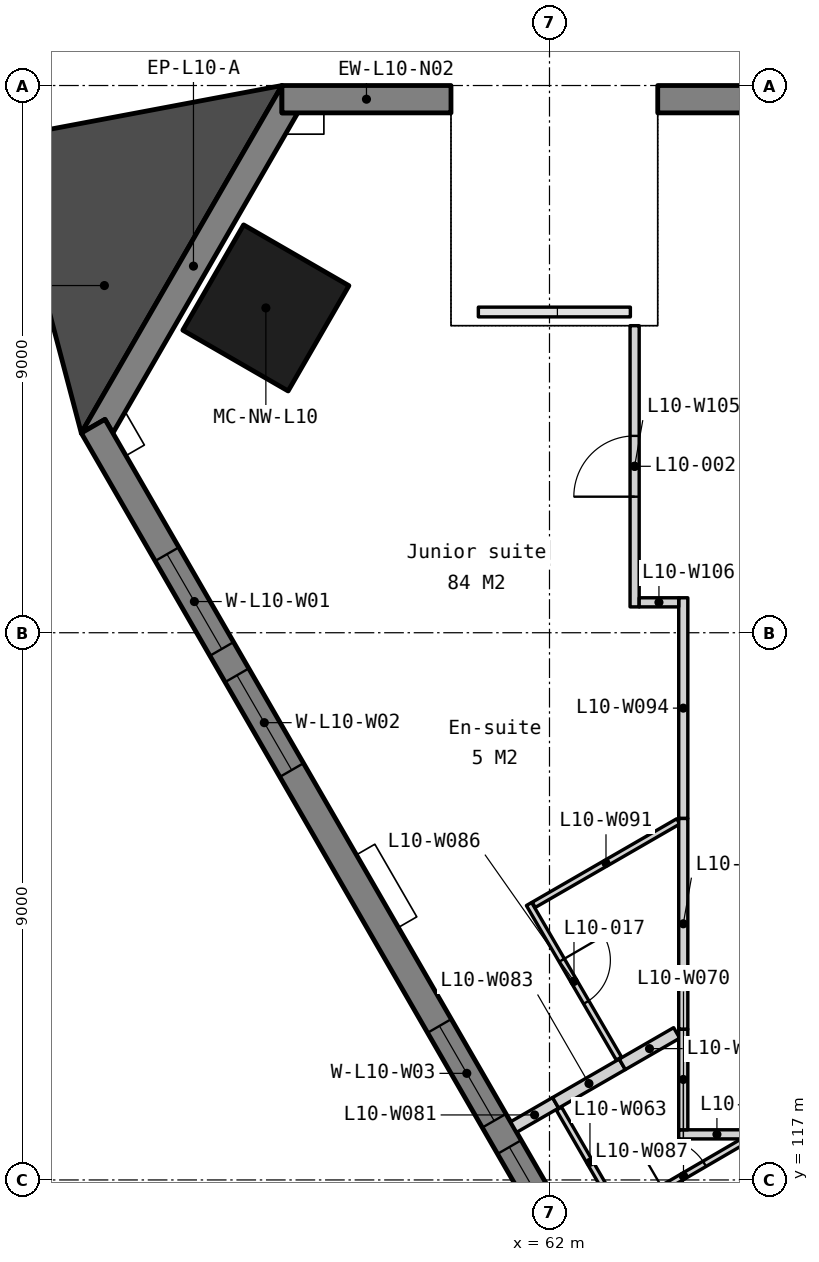
"""IFC4 building model, lengths in metres.
Left out: names, types, materials, properties, quantities, classifications, styles, units other than length and angle.
Written with IfcOpenShell. Run it as: python <this file> out.ifc"""

import sys

from ifc_helpers import new_model, si_unit, direction, frame, frame_2d, origin, origin_2d, place, context, subcontext, project, spatial, polyline, rectangle, outline, extrude, element, fill, save


model = new_model("IFC4")
c1 = context("Model", 3, precision=1e-05, world=origin(), true_north=direction((0.0, 1.0)))
c2 = subcontext(c1, "Body", "Model", "MODEL_VIEW")
j1 = project(units=[si_unit("LENGTHUNIT", "METRE"), si_unit("PLANEANGLEUNIT", "RADIAN")], contexts=[c1])
p1 = place(None, origin())
s1 = spatial("IfcSite", under=j1, at=p1, CompositionType="ELEMENT")
p2 = place(p1, origin())
s2 = spatial("IfcBuilding", under=s1, at=p2, CompositionType="ELEMENT")
p3 = place(p2, frame((0.0, 0.0, 49.0)))
s3 = spatial("IfcBuildingStorey", under=s2, at=p3, CompositionType="ELEMENT", Elevation=49.0)
p4 = place(p3, frame((57.336, 131.342, 0.0), z_axis=(0.0, 0.0, 1.0), x_axis=(-0.5, -0.866025403784, 0.0)))
e1 = element("IfcColumn", 1, at=p4, inside=s3, PredefinedType="COLUMN", context=c2, shape_type="SweptSolid", body=[
    extrude(rectangle(XDim=2.0, YDim=2.0, at=origin_2d()), origin(), (0.0, 0.0, 1.0), 3.5),
])
p5 = place(p3, frame((0.0, 0.0, -0.15)))
e2 = element("IfcWall", 2, at=p5, inside=s3, PredefinedType="SOLIDWALL", context=c2, shape_type="SweptSolid", body=[
    extrude(outline(polyline([(57.6, 135.0), (57.6, 134.55), (57.86, 134.55), (54.82, 129.284), (54.69, 129.509), (54.3, 129.284), (57.6, 135.0)])), origin(), (0.0, 0.0, 1.0), 3.5),
])
p6 = place(p3, frame((102.4, 134.775, -0.15), z_axis=(0.0, 0.0, 1.0), x_axis=(-1.0, 0.0, 0.0)))
e3 = element("IfcWall", 3, at=p6, inside=s3, PredefinedType="SOLIDWALL", context=c2, shape_type="SweptSolid", body=[
    extrude(outline(polyline([(0.0, 0.0), (0.0, 3.5), (38.62, 3.5), (38.62, 0.0), (0.0, 0.0)])), frame((0.0, 0.225, 0.0), z_axis=(0.0, -1.0, 0.0), x_axis=(1.0, 0.0, 0.0)), (0.0, 0.0, 1.0), 0.45),
])
p7 = place(p6, frame((2.43, 0.0, 1.05)))
e4 = element("IfcOpeningElement", 4, at=p7, cuts=e3, PredefinedType="OPENING", context=c2, shape_type="SweptSolid", body=[
    extrude(rectangle(XDim=1.8, YDim=1.5, at=frame_2d((0.9, 0.75))), frame((0.0, 0.235, 0.0), z_axis=(0.0, -1.0, 0.0), x_axis=(1.0, 0.0, 0.0)), (0.0, 0.0, 1.0), 0.47),
])
p8 = place(p6, frame((4.73, 0.0, 1.05)))
e5 = element("IfcOpeningElement", 5, at=p8, cuts=e3, PredefinedType="OPENING", context=c2, shape_type="SweptSolid", body=[
    extrude(rectangle(XDim=1.8, YDim=1.5, at=frame_2d((0.9, 0.75))), frame((0.0, 0.235, 0.0), z_axis=(0.0, -1.0, 0.0), x_axis=(1.0, 0.0, 0.0)), (0.0, 0.0, 1.0), 0.47),
])
p9 = place(p6, frame((11.39, 0.0, 1.05)))
e6 = element("IfcOpeningElement", 6, at=p9, cuts=e3, PredefinedType="OPENING", context=c2, shape_type="SweptSolid", body=[
    extrude(rectangle(XDim=1.8, YDim=1.5, at=frame_2d((0.9, 0.75))), frame((0.0, 0.235, 0.0), z_axis=(0.0, -1.0, 0.0), x_axis=(1.0, 0.0, 0.0)), (0.0, 0.0, 1.0), 0.47),
])
p10 = place(p6, frame((13.69, 0.0, 1.05)))
e7 = element("IfcOpeningElement", 7, at=p10, cuts=e3, PredefinedType="OPENING", context=c2, shape_type="SweptSolid", body=[
    extrude(rectangle(XDim=1.8, YDim=1.5, at=frame_2d((0.9, 0.75))), frame((0.0, 0.235, 0.0), z_axis=(0.0, -1.0, 0.0), x_axis=(1.0, 0.0, 0.0)), (0.0, 0.0, 1.0), 0.47),
])
p11 = place(p6, frame((20.35, 0.0, 1.05)))
e8 = element("IfcOpeningElement", 8, at=p11, cuts=e3, PredefinedType="OPENING", context=c2, shape_type="SweptSolid", body=[
    extrude(rectangle(XDim=1.8, YDim=1.5, at=frame_2d((0.9, 0.75))), frame((0.0, 0.235, 0.0), z_axis=(0.0, -1.0, 0.0), x_axis=(1.0, 0.0, 0.0)), (0.0, 0.0, 1.0), 0.47),
])
p12 = place(p6, frame((22.65, 0.0, 1.05)))
e9 = element("IfcOpeningElement", 9, at=p12, cuts=e3, PredefinedType="OPENING", context=c2, shape_type="SweptSolid", body=[
    extrude(rectangle(XDim=1.8, YDim=1.5, at=frame_2d((0.9, 0.75))), frame((0.0, 0.235, 0.0), z_axis=(0.0, -1.0, 0.0), x_axis=(1.0, 0.0, 0.0)), (0.0, 0.0, 1.0), 0.47),
])
p13 = place(p6, frame((29.31, 0.0, 1.05)))
e10 = element("IfcOpeningElement", 10, at=p13, cuts=e3, PredefinedType="OPENING", context=c2, shape_type="SweptSolid", body=[
    extrude(rectangle(XDim=1.8, YDim=1.5, at=frame_2d((0.9, 0.75))), frame((0.0, 0.235, 0.0), z_axis=(0.0, -1.0, 0.0), x_axis=(1.0, 0.0, 0.0)), (0.0, 0.0, 1.0), 0.47),
])
p14 = place(p6, frame((31.61, 0.0, 1.05)))
e11 = element("IfcOpeningElement", 11, at=p14, cuts=e3, PredefinedType="OPENING", context=c2, shape_type="SweptSolid", body=[
    extrude(rectangle(XDim=1.8, YDim=1.5, at=frame_2d((0.9, 0.75))), frame((0.0, 0.235, 0.0), z_axis=(0.0, -1.0, 0.0), x_axis=(1.0, 0.0, 0.0)), (0.0, 0.0, 1.0), 0.47),
])
p15 = place(p3, frame((60.38, 134.775, -0.15), z_axis=(0.0, 0.0, 1.0), x_axis=(-1.0, 0.0, 0.0)))
e12 = element("IfcWall", 12, at=p15, inside=s3, PredefinedType="SOLIDWALL", context=c2, shape_type="SweptSolid", body=[
    extrude(outline(polyline([(2.78, 3.5), (2.78, 0.0), (0.0, 0.0), (0.0, 3.5), (2.78, 3.5)])), frame((0.0, 0.225, 0.0), z_axis=(0.0, -1.0, 0.0), x_axis=(1.0, 0.0, 0.0)), (0.0, 0.0, 1.0), 0.45),
])
p16 = place(p3, frame((54.495, 129.397, -0.15), z_axis=(0.0, 0.0, 1.0), x_axis=(0.499999201451, -0.866025864826, 0.0)))
e13 = element("IfcWall", 13, at=p16, inside=s3, PredefinedType="SOLIDWALL", context=c2, shape_type="SweptSolid", body=[
    extrude(outline(polyline([(44.8, 0.0), (44.8, 3.5), (0.0, 3.5), (0.0, 0.0), (44.8, 0.0)])), frame((0.0, 0.225, 0.0), z_axis=(0.0, -1.0, 0.0), x_axis=(1.0, 0.0, 0.0)), (0.0, 0.0, 1.0), 0.45),
])
p17 = place(p16, frame((2.43, 0.0, 1.05)))
e14 = element("IfcOpeningElement", 14, at=p17, cuts=e13, PredefinedType="OPENING", context=c2, shape_type="SweptSolid", body=[
    extrude(rectangle(XDim=1.8, YDim=1.5, at=frame_2d((0.9, 0.75))), frame((0.0, 0.235, 0.0), z_axis=(0.0, -1.0, 0.0), x_axis=(1.0, 0.0, 0.0)), (0.0, 0.0, 1.0), 0.47),
])
p18 = place(p16, frame((4.73, 0.0, 1.05)))
e15 = element("IfcOpeningElement", 15, at=p18, cuts=e13, PredefinedType="OPENING", context=c2, shape_type="SweptSolid", body=[
    extrude(rectangle(XDim=1.8, YDim=1.5, at=frame_2d((0.9, 0.75))), frame((0.0, 0.235, 0.0), z_axis=(0.0, -1.0, 0.0), x_axis=(1.0, 0.0, 0.0)), (0.0, 0.0, 1.0), 0.47),
])
p19 = place(p16, frame((11.39, 0.0, 1.05)))
e16 = element("IfcOpeningElement", 16, at=p19, cuts=e13, PredefinedType="OPENING", context=c2, shape_type="SweptSolid", body=[
    extrude(rectangle(XDim=1.8, YDim=1.5, at=frame_2d((0.9, 0.75))), frame((0.0, 0.235, 0.0), z_axis=(0.0, -1.0, 0.0), x_axis=(1.0, 0.0, 0.0)), (0.0, 0.0, 1.0), 0.47),
])
p20 = place(p16, frame((13.69, 0.0, 1.05)))
e17 = element("IfcOpeningElement", 17, at=p20, cuts=e13, PredefinedType="OPENING", context=c2, shape_type="SweptSolid", body=[
    extrude(rectangle(XDim=1.8, YDim=1.5, at=frame_2d((0.9, 0.75))), frame((0.0, 0.235, 0.0), z_axis=(0.0, -1.0, 0.0), x_axis=(1.0, 0.0, 0.0)), (0.0, 0.0, 1.0), 0.47),
])
p21 = place(p16, frame((20.35, 0.0, 1.05)))
e18 = element("IfcOpeningElement", 18, at=p21, cuts=e13, PredefinedType="OPENING", context=c2, shape_type="SweptSolid", body=[
    extrude(rectangle(XDim=1.8, YDim=1.5, at=frame_2d((0.9, 0.75))), frame((0.0, 0.235, 0.0), z_axis=(0.0, -1.0, 0.0), x_axis=(1.0, 0.0, 0.0)), (0.0, 0.0, 1.0), 0.47),
])
p22 = place(p16, frame((22.65, 0.0, 1.05)))
e19 = element("IfcOpeningElement", 19, at=p22, cuts=e13, PredefinedType="OPENING", context=c2, shape_type="SweptSolid", body=[
    extrude(rectangle(XDim=1.8, YDim=1.5, at=frame_2d((0.9, 0.75))), frame((0.0, 0.235, 0.0), z_axis=(0.0, -1.0, 0.0), x_axis=(1.0, 0.0, 0.0)), (0.0, 0.0, 1.0), 0.47),
])
p23 = place(p16, frame((29.31, 0.0, 1.05)))
e20 = element("IfcOpeningElement", 20, at=p23, cuts=e13, PredefinedType="OPENING", context=c2, shape_type="SweptSolid", body=[
    extrude(rectangle(XDim=1.8, YDim=1.5, at=frame_2d((0.9, 0.75))), frame((0.0, 0.235, 0.0), z_axis=(0.0, -1.0, 0.0), x_axis=(1.0, 0.0, 0.0)), (0.0, 0.0, 1.0), 0.47),
])
p24 = place(p16, frame((31.61, 0.0, 1.05)))
e21 = element("IfcOpeningElement", 21, at=p24, cuts=e13, PredefinedType="OPENING", context=c2, shape_type="SweptSolid", body=[
    extrude(rectangle(XDim=1.8, YDim=1.5, at=frame_2d((0.9, 0.75))), frame((0.0, 0.235, 0.0), z_axis=(0.0, -1.0, 0.0), x_axis=(1.0, 0.0, 0.0)), (0.0, 0.0, 1.0), 0.47),
])
p25 = place(p16, frame((38.27, 0.0, 1.05)))
e22 = element("IfcOpeningElement", 22, at=p25, cuts=e13, PredefinedType="OPENING", context=c2, shape_type="SweptSolid", body=[
    extrude(rectangle(XDim=1.8, YDim=1.5, at=frame_2d((0.9, 0.75))), frame((0.0, 0.235, 0.0), z_axis=(0.0, -1.0, 0.0), x_axis=(1.0, 0.0, 0.0)), (0.0, 0.0, 1.0), 0.47),
])
p26 = place(p16, frame((40.57, 0.0, 1.05)))
e23 = element("IfcOpeningElement", 23, at=p26, cuts=e13, PredefinedType="OPENING", context=c2, shape_type="SweptSolid", body=[
    extrude(rectangle(XDim=1.8, YDim=1.5, at=frame_2d((0.9, 0.75))), frame((0.0, 0.235, 0.0), z_axis=(0.0, -1.0, 0.0), x_axis=(1.0, 0.0, 0.0)), (0.0, 0.0, 1.0), 0.47),
])
p27 = place(p2, frame((0.0, 0.0, 45.5)))
s4 = spatial("IfcBuildingStorey", under=s2, at=p27, CompositionType="ELEMENT", Elevation=45.5)
for number, where, z_axis, x_axis in (
    (24, (63.555, 135.0, 0.0), (0.0, 0.0, 1.0), (0.0, -1.0, 0.0)),
    (25, (60.605, 135.0, 0.0), (0.0, 0.0, 1.0), (0.0, -1.0, 0.0)),
):
    element("IfcWall", number, at=place(p27, frame(where, z_axis=z_axis, x_axis=x_axis)), inside=s4, PredefinedType="SOLIDWALL", context=c2, shape_type="SweptSolid", body=[
        extrude(rectangle(XDim=3.95, YDim=0.45, at=frame_2d((1.975, 0.0))), origin(), (0.0, 0.0, 1.0), 6.85),
    ])
p28 = place(p3, frame((0.0, 0.0, -0.15)))
e26 = element("IfcWall", 26, at=p28, inside=s3, PredefinedType="SOLIDWALL", context=c2, shape_type="SweptSolid", body=[
    extrude(outline(polyline([(57.6, 135.0), (53.019, 134.136), (54.3, 129.284), (57.6, 135.0)])), origin(), (0.0, 0.0, 1.0), 3.5),
])
p29 = place(p3, frame((63.65, 113.99, 0.0), z_axis=(0.0, 0.0, 1.0), x_axis=(0.866012505881, 0.500022339158, 0.0)))
e27 = element("IfcWall", 27, at=p29, inside=s3, PredefinedType="PARTITIONING", context=c2, shape_type="SweptSolid", body=[
    extrude(rectangle(XDim=7.235, YDim=0.2, at=frame_2d((3.618, 0.0))), origin(), (0.0, 0.0, 1.0), 3.35),
])
p30 = place(p3, frame((62.156, 118.173, 0.0), z_axis=(0.0, 0.0, 1.0), x_axis=(0.500026340207, -0.866010195725, 0.0)))
e28 = element("IfcWall", 28, at=p30, inside=s3, PredefinedType="PARTITIONING", context=c2, shape_type="SweptSolid", body=[
    extrude(rectangle(XDim=2.04, YDim=0.1, at=frame_2d((1.02, 0.0))), origin(), (0.0, 0.0, 1.0), 3.35),
])
p31 = place(p3, frame((64.125, 117.75, 0.0), z_axis=(0.0, 0.0, 1.0), x_axis=(1.0, 0.0, 0.0)))
e29 = element("IfcWall", 29, at=p31, inside=s3, PredefinedType="PARTITIONING", context=c2, shape_type="SweptSolid", body=[
    extrude(rectangle(XDim=1.257, YDim=0.15, at=frame_2d((0.628, 0.0))), origin(), (0.0, 0.0, 1.0), 3.35),
])
p32 = place(p3, frame((63.202, 116.48, 0.0), z_axis=(0.0, 0.0, 1.0), x_axis=(0.864103474136, 0.503314202051, 0.0)))
e30 = element("IfcWall", 30, at=p32, inside=s3, PredefinedType="PARTITIONING", context=c2, shape_type="SweptSolid", body=[
    extrude(rectangle(XDim=2.318, YDim=0.1, at=frame_2d((1.159, 0.0))), origin(), (0.0, 0.0, 1.0), 3.35),
])
p33 = place(p32, frame((0.759, 0.0, 0.0)))
e31 = element("IfcOpeningElement", 31, at=p33, cuts=e30, PredefinedType="OPENING", context=c2, shape_type="SweptSolid", body=[
    extrude(rectangle(XDim=0.8, YDim=2.1, at=frame_2d((0.4, 1.05))), frame((0.0, 0.06, 0.0), z_axis=(0.0, -1.0, 0.0), x_axis=(1.0, 0.0, 0.0)), (0.0, 0.0, 1.0), 0.12),
])
p34 = place(p3, frame((61.41, 117.87, 0.0), z_axis=(0.0, 0.0, 1.0), x_axis=(0.866068339032, 0.499925626596, 0.0)))
e32 = element("IfcWall", 32, at=p34, inside=s3, PredefinedType="PARTITIONING", context=c2, shape_type="SweptSolid", body=[
    extrude(rectangle(XDim=0.797, YDim=0.2, at=frame_2d((0.399, 0.0))), origin(), (0.0, 0.0, 1.0), 3.35),
])
p35 = place(p3, frame((62.1, 118.269, 0.0), z_axis=(0.0, 0.0, 1.0), x_axis=(0.866028304915, 0.499994975061, 0.0)))
e33 = element("IfcWall", 33, at=p35, inside=s3, PredefinedType="PARTITIONING", context=c2, shape_type="SweptSolid", body=[
    extrude(rectangle(XDim=1.267, YDim=0.2, at=frame_2d((0.633, 0.0))), origin(), (0.0, 0.0, 1.0), 3.35),
])
p36 = place(p3, frame((63.197, 118.902, 0.0), z_axis=(0.0, 0.0, 1.0), x_axis=(0.866067506982, 0.499927068031, 0.0)))
e34 = element("IfcWall", 34, at=p36, inside=s3, PredefinedType="PARTITIONING", context=c2, shape_type="SweptSolid", body=[
    extrude(rectangle(XDim=1.033, YDim=0.2, at=frame_2d((0.517, 0.0))), origin(), (0.0, 0.0, 1.0), 3.35),
])
p37 = place(p3, frame((61.663, 121.538, 0.0), z_axis=(0.0, 0.0, 1.0), x_axis=(0.502884554521, -0.864353587847, 0.0)))
e35 = element("IfcWall", 35, at=p37, inside=s3, PredefinedType="PARTITIONING", context=c2, shape_type="SweptSolid", body=[
    extrude(rectangle(XDim=2.94, YDim=0.1, at=frame_2d((1.47, 0.0))), origin(), (0.0, 0.0, 1.0), 3.35),
])
p38 = place(p37, frame((1.07, 0.0, 0.0)))
e36 = element("IfcOpeningElement", 36, at=p38, cuts=e35, PredefinedType="OPENING", context=c2, shape_type="SweptSolid", body=[
    extrude(rectangle(XDim=0.8, YDim=2.1, at=frame_2d((0.4, 1.05))), frame((0.0, 0.06, 0.0), z_axis=(0.0, -1.0, 0.0), x_axis=(1.0, 0.0, 0.0)), (0.0, 0.0, 1.0), 0.12),
])
p39 = place(p3, frame((64.2, 117.825, 0.0), z_axis=(0.0, 0.0, 1.0), x_axis=(0.0, 1.0, 0.0)))
e37 = element("IfcWall", 37, at=p39, inside=s3, PredefinedType="PARTITIONING", context=c2, shape_type="SweptSolid", body=[
    extrude(rectangle(XDim=1.656, YDim=0.15, at=frame_2d((0.828, 0.0))), origin(), (0.0, 0.0, 1.0), 3.35),
])
p40 = place(p3, frame((61.74, 121.525, 0.0), z_axis=(0.0, 0.0, 1.0), x_axis=(0.866012292785, 0.50002270823, 0.0)))
e38 = element("IfcWall", 38, at=p40, inside=s3, PredefinedType="PARTITIONING", context=c2, shape_type="SweptSolid", body=[
    extrude(rectangle(XDim=2.745, YDim=0.1, at=frame_2d((1.373, 0.0))), origin(), (0.0, 0.0, 1.0), 3.35),
])
p41 = place(p3, frame((64.2, 122.945, 0.0), z_axis=(0.0, 0.0, 1.0), x_axis=(0.0, 1.0, 0.0)))
e39 = element("IfcWall", 39, at=p41, inside=s3, PredefinedType="PARTITIONING", context=c2, shape_type="SweptSolid", body=[
    extrude(rectangle(XDim=3.63, YDim=0.15, at=frame_2d((1.815, 0.0))), origin(), (0.0, 0.0, 1.0), 3.35),
])
p42 = place(p3, frame((64.2, 119.481, 0.0), z_axis=(0.0, 0.0, 1.0), x_axis=(0.0, 1.0, 0.0)))
e40 = element("IfcWall", 40, at=p42, inside=s3, PredefinedType="PARTITIONING", context=c2, shape_type="SweptSolid", body=[
    extrude(rectangle(XDim=3.464, YDim=0.15, at=frame_2d((1.732, 0.0))), origin(), (0.0, 0.0, 1.0), 3.35),
])
p43 = place(p3, frame((63.4, 126.425, 0.0), z_axis=(0.0, 0.0, 1.0), x_axis=(0.0, 1.0, 0.0)))
e41 = element("IfcWall", 41, at=p43, inside=s3, PredefinedType="PARTITIONING", context=c2, shape_type="SweptSolid", body=[
    extrude(rectangle(XDim=4.625, YDim=0.15, at=frame_2d((2.312, 0.0))), origin(), (0.0, 0.0, 1.0), 3.35),
])
p44 = place(p43, frame((1.812, 0.0, 0.0)))
e42 = element("IfcOpeningElement", 42, at=p44, cuts=e41, PredefinedType="OPENING", context=c2, shape_type="SweptSolid", body=[
    extrude(rectangle(XDim=1.0, YDim=2.1, at=frame_2d((0.5, 1.05))), frame((0.0, 0.085, 0.0), z_axis=(0.0, -1.0, 0.0), x_axis=(1.0, 0.0, 0.0)), (0.0, 0.0, 1.0), 0.17),
])
p45 = place(p3, frame((63.475, 126.5, 0.0), z_axis=(0.0, 0.0, 1.0), x_axis=(1.0, 0.0, 0.0)))
e43 = element("IfcWall", 43, at=p45, inside=s3, PredefinedType="PARTITIONING", context=c2, shape_type="SweptSolid", body=[
    extrude(rectangle(XDim=0.65, YDim=0.15, at=frame_2d((0.325, 0.0))), origin(), (0.0, 0.0, 1.0), 3.35),
])
p46 = place(p17, origin())
e44 = element("IfcWindow", 44, at=p46, inside=s3, PartitioningType="SINGLE_PANEL", PredefinedType="WINDOW", context=c2, shape_type="SweptSolid", body=[
    extrude(rectangle(XDim=1.8, YDim=1.5, at=frame_2d((0.9, 0.75))), frame((0.0, 0.03, 0.0), z_axis=(0.0, -1.0, 0.0), x_axis=(1.0, 0.0, 0.0)), (0.0, 0.0, 1.0), 0.06),
])
fill(e14, e44)
p47 = place(p18, origin())
e45 = element("IfcWindow", 45, at=p47, inside=s3, PartitioningType="SINGLE_PANEL", PredefinedType="WINDOW", context=c2, shape_type="SweptSolid", body=[
    extrude(rectangle(XDim=1.8, YDim=1.5, at=frame_2d((0.9, 0.75))), frame((0.0, 0.03, 0.0), z_axis=(0.0, -1.0, 0.0), x_axis=(1.0, 0.0, 0.0)), (0.0, 0.0, 1.0), 0.06),
])
fill(e15, e45)
p48 = place(p19, origin())
e46 = element("IfcWindow", 46, at=p48, inside=s3, PartitioningType="SINGLE_PANEL", PredefinedType="WINDOW", context=c2, shape_type="SweptSolid", body=[
    extrude(rectangle(XDim=1.8, YDim=1.5, at=frame_2d((0.9, 0.75))), frame((0.0, 0.03, 0.0), z_axis=(0.0, -1.0, 0.0), x_axis=(1.0, 0.0, 0.0)), (0.0, 0.0, 1.0), 0.06),
])
fill(e16, e46)
p49 = place(p20, origin())
e47 = element("IfcWindow", 47, at=p49, inside=s3, PartitioningType="SINGLE_PANEL", PredefinedType="WINDOW", context=c2, shape_type="SweptSolid", body=[
    extrude(rectangle(XDim=1.8, YDim=1.5, at=frame_2d((0.9, 0.75))), frame((0.0, 0.03, 0.0), z_axis=(0.0, -1.0, 0.0), x_axis=(1.0, 0.0, 0.0)), (0.0, 0.0, 1.0), 0.06),
])
fill(e17, e47)
p50 = place(p44, origin())
e48 = element("IfcDoor", 48, at=p50, inside=s3, OperationType="SINGLE_SWING_LEFT", PredefinedType="DOOR", context=c2, shape_type="SweptSolid", body=[
    extrude(rectangle(XDim=1.0, YDim=2.1, at=frame_2d((0.5, 1.05))), frame((0.0, 0.025, 0.0), z_axis=(0.0, -1.0, 0.0), x_axis=(1.0, 0.0, 0.0)), (0.0, 0.0, 1.0), 0.05),
])
fill(e42, e48)
p51 = place(p38, origin())
e49 = element("IfcDoor", 49, at=p51, inside=s3, OperationType="SINGLE_SWING_LEFT", PredefinedType="DOOR", context=c2, shape_type="SweptSolid", body=[
    extrude(rectangle(XDim=0.8, YDim=2.1, at=frame_2d((0.4, 1.05))), frame((0.0, 0.025, 0.0), z_axis=(0.0, -1.0, 0.0), x_axis=(1.0, 0.0, 0.0)), (0.0, 0.0, 1.0), 0.05),
])
fill(e36, e49)
p52 = place(p33, origin())
e50 = element("IfcDoor", 50, at=p52, inside=s3, OperationType="SINGLE_SWING_LEFT", PredefinedType="DOOR", context=c2, shape_type="SweptSolid", body=[
    extrude(rectangle(XDim=0.8, YDim=2.1, at=frame_2d((0.4, 1.05))), frame((0.0, 0.025, 0.0), z_axis=(0.0, -1.0, 0.0), x_axis=(1.0, 0.0, 0.0)), (0.0, 0.0, 1.0), 0.05),
])
fill(e31, e50)
save(model, sys.argv[1])
